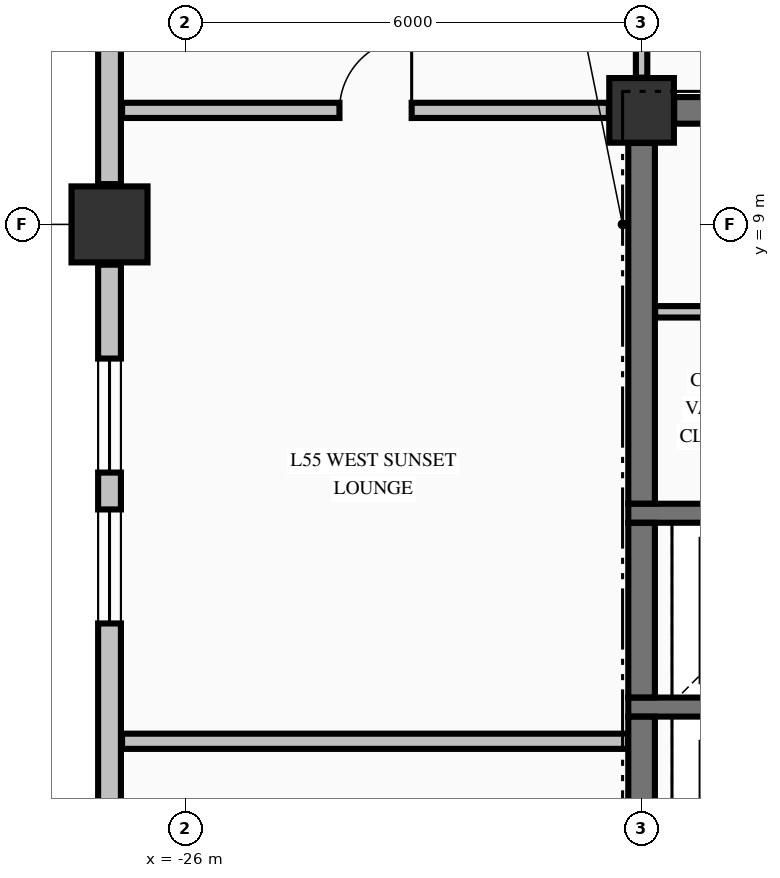
"""IFC4 building model, lengths in metres.
Left out: names, types, materials, properties, quantities, classifications, styles, units other than length and angle.
Written with IfcOpenShell. Run it as: python <this file> out.ifc"""

import sys

from ifc_helpers import new_model, si_unit, direction, frame, frame_2d, origin, origin_2d, place, context, subcontext, project, spatial, rectangle, extrude, element, fill, save


model = new_model("IFC4")
c1 = context("Model", 3, precision=1e-05, world=origin(), true_north=direction((0.0, 1.0)))
c2 = subcontext(c1, "Body", "Model", "MODEL_VIEW")
j1 = project(units=[si_unit("LENGTHUNIT", "METRE"), si_unit("PLANEANGLEUNIT", "RADIAN")], contexts=[c1])
p1 = place(None, origin())
s1 = spatial("IfcSite", under=j1, at=p1, CompositionType="ELEMENT")
p2 = place(p1, origin())
s2 = spatial("IfcBuilding", under=s1, at=p2, CompositionType="ELEMENT")
p3 = place(p2, frame((0.0, 0.0, 211.86)))
s3 = spatial("IfcBuildingStorey", under=s2, at=p3, CompositionType="ELEMENT", Elevation=211.86)
p4 = place(p3, frame((-27.0, 9.0, -0.325), z_axis=(0.0, 0.0, 1.0), x_axis=(1.0, 0.0, 0.0)))
e1 = element("IfcColumn", 1, at=p4, inside=s3, PredefinedType="COLUMN", context=c2, shape_type="SweptSolid", body=[
    extrude(rectangle(XDim=1.0, YDim=1.0, at=origin_2d()), origin(), (0.0, 0.0, 1.0), 3.475),
])
p5 = place(p3, frame((-20.0, 10.5, -0.325), z_axis=(0.0, 0.0, 1.0), x_axis=(1.0, 0.0, 0.0)))
e2 = element("IfcColumn", 2, at=p5, inside=s3, PredefinedType="COLUMN", context=c2, shape_type="SweptSolid", body=[
    extrude(rectangle(XDim=0.85, YDim=0.85, at=origin_2d()), origin(), (0.0, 0.0, 1.0), 3.475),
])
p6 = place(p3, frame((-27.0, 8.47, 0.0), z_axis=(0.0, 0.0, 1.0), x_axis=(0.0, -1.0, 0.0)))
e3 = element("IfcWall", 3, at=p6, inside=s3, PredefinedType="STANDARD", context=c2, shape_type="SweptSolid", body=[
    extrude(rectangle(XDim=7.94, YDim=0.3, at=frame_2d((3.97, 0.0))), origin(), (0.0, 0.0, 1.0), 2.542),
])
p7 = place(p6, frame((1.235, 0.0, 0.72)))
e4 = element("IfcOpeningElement", 4, at=p7, cuts=e3, PredefinedType="OPENING", context=c2, shape_type="SweptSolid", body=[
    extrude(rectangle(XDim=1.5, YDim=1.6, at=frame_2d((0.75, 0.8))), frame((0.0, 0.16, 0.0), z_axis=(0.0, -1.0, 0.0), x_axis=(1.0, 0.0, 0.0)), (0.0, 0.0, 1.0), 0.32),
])
p8 = place(p6, frame((3.22, 0.0, 0.72)))
e5 = element("IfcOpeningElement", 5, at=p8, cuts=e3, PredefinedType="OPENING", context=c2, shape_type="SweptSolid", body=[
    extrude(rectangle(XDim=1.5, YDim=1.6, at=frame_2d((0.75, 0.8))), frame((0.0, 0.16, 0.0), z_axis=(0.0, -1.0, 0.0), x_axis=(1.0, 0.0, 0.0)), (0.0, 0.0, 1.0), 0.32),
])
p9 = place(p3, frame((-27.0, 18.97, 0.0), z_axis=(0.0, 0.0, 1.0), x_axis=(0.0, -1.0, 0.0)))
e6 = element("IfcWall", 6, at=p9, inside=s3, PredefinedType="STANDARD", context=c2, shape_type="SweptSolid", body=[
    extrude(rectangle(XDim=9.44, YDim=0.3, at=frame_2d((4.72, 0.0))), origin(), (0.0, 0.0, 1.0), 2.542),
])
for number, where, z_axis, x_axis in (
    (7, (-20.175, 2.65, 0.0), (0.0, 0.0, 1.0), (1.0, 0.0, 0.0)),
    (8, (-20.175, 5.2, 0.0), (0.0, 0.0, 1.0), (1.0, 0.0, 0.0)),
):
    element("IfcWall", number, at=place(p3, frame(where, z_axis=z_axis, x_axis=x_axis)), inside=s3, PredefinedType="SOLIDWALL", context=c2, shape_type="SweptSolid", body=[
        extrude(rectangle(XDim=3.2, YDim=0.25, at=frame_2d((1.6, 0.0))), origin(), (0.0, 0.0, 1.0), 3.15),
    ])
p10 = place(p3, frame((-19.571, 10.5, 0.0), z_axis=(0.0, 0.0, 1.0), x_axis=(1.0, 0.0, 0.0)))
e9 = element("IfcWall", 9, at=p10, inside=s3, PredefinedType="SHEAR", context=c2, shape_type="SweptSolid", body=[
    extrude(rectangle(XDim=4.871, YDim=0.35, at=frame_2d((2.436, 0.0))), origin(), (0.0, 0.0, 1.0), 3.15),
])
p11 = place(p10, frame((3.121, 0.0, 0.0)))
e10 = element("IfcOpeningElement", 10, at=p11, cuts=e9, PredefinedType="OPENING", context=c2, shape_type="SweptSolid", body=[
    extrude(rectangle(XDim=1.1, YDim=2.15, at=frame_2d((0.55, 1.075))), frame((0.0, 0.185, 0.0), z_axis=(0.0, -1.0, 0.0), x_axis=(1.0, 0.0, 0.0)), (0.0, 0.0, 1.0), 0.37),
])
p12 = place(p3, frame((-26.835, 2.2, 0.0), z_axis=(0.0, 0.0, 1.0), x_axis=(1.0, 0.0, 0.0)))
e11 = element("IfcWall", 11, at=p12, inside=s3, PredefinedType="PARTITIONING", context=c2, shape_type="SweptSolid", body=[
    extrude(rectangle(XDim=6.657, YDim=0.2, at=frame_2d((3.329, 0.0))), origin(), (0.0, 0.0, 1.0), 3.15),
])
p13 = place(p3, frame((-19.822, 7.85, 0.0), z_axis=(0.0, 0.0, 1.0), x_axis=(1.0, 0.0, 0.0)))
e12 = element("IfcWall", 12, at=p13, inside=s3, PredefinedType="PARTITIONING", context=c2, shape_type="SweptSolid", body=[
    extrude(rectangle(XDim=2.822, YDim=0.15, at=frame_2d((1.411, 0.0))), origin(), (0.0, 0.0, 1.0), 3.15),
])
p14 = place(p3, frame((-26.835, 10.5, 0.0), z_axis=(0.0, 0.0, 1.0), x_axis=(1.0, 0.0, 0.0)))
e13 = element("IfcWall", 13, at=p14, inside=s3, PredefinedType="PARTITIONING", context=c2, shape_type="SweptSolid", body=[
    extrude(rectangle(XDim=6.404, YDim=0.2, at=frame_2d((3.202, 0.0))), origin(), (0.0, 0.0, 1.0), 3.15),
])
p15 = place(p14, frame((2.86, 0.0, 0.0)))
e14 = element("IfcOpeningElement", 14, at=p15, cuts=e13, PredefinedType="OPENING", context=c2, shape_type="SweptSolid", body=[
    extrude(rectangle(XDim=0.95, YDim=2.15, at=frame_2d((0.475, 1.075))), frame((0.0, 0.11, 0.0), z_axis=(0.0, -1.0, 0.0), x_axis=(1.0, 0.0, 0.0)), (0.0, 0.0, 1.0), 0.22),
])
p16 = place(p3, frame((-20.0, 0.429, 0.0), z_axis=(0.0, 0.0, 1.0), x_axis=(0.0, 1.0, 0.0)))
e15 = element("IfcWall", 15, at=p16, inside=s3, PredefinedType="SHEAR", context=c2, shape_type="SweptSolid", body=[
    extrude(rectangle(XDim=2.094, YDim=0.35, at=frame_2d((1.047, 0.0))), origin(), (0.0, 0.0, 1.0), 3.15),
])
p17 = place(p3, frame((-20.0, 2.777, 0.0), z_axis=(0.0, 0.0, 1.0), x_axis=(0.0, 1.0, 0.0)))
e16 = element("IfcWall", 16, at=p17, inside=s3, PredefinedType="SHEAR", context=c2, shape_type="SweptSolid", body=[
    extrude(rectangle(XDim=2.296, YDim=0.35, at=frame_2d((1.148, 0.0))), origin(), (0.0, 0.0, 1.0), 3.15),
])
p18 = place(p3, frame((-20.0, 5.327, 0.0), z_axis=(0.0, 0.0, 1.0), x_axis=(0.0, 1.0, 0.0)))
e17 = element("IfcWall", 17, at=p18, inside=s3, PredefinedType="SHEAR", context=c2, shape_type="SweptSolid", body=[
    extrude(rectangle(XDim=4.744, YDim=0.35, at=frame_2d((2.372, 0.0))), origin(), (0.0, 0.0, 1.0), 3.15),
])
p19 = place(p3, frame((-20.0, 10.931, 0.0), z_axis=(0.0, 0.0, 1.0), x_axis=(0.0, 1.0, 0.0)))
e18 = element("IfcWall", 18, at=p19, inside=s3, PredefinedType="PARTITIONING", context=c2, shape_type="SweptSolid", body=[
    extrude(rectangle(XDim=2.116, YDim=0.15, at=frame_2d((1.058, 0.0))), origin(), (0.0, 0.0, 1.0), 2.342),
])
p20 = place(p19, frame((0.414, 0.0, 0.0)))
e19 = element("IfcOpeningElement", 19, at=p20, cuts=e18, PredefinedType="OPENING", context=c2, shape_type="SweptSolid", body=[
    extrude(rectangle(XDim=0.95, YDim=2.15, at=frame_2d((0.475, 1.075))), frame((0.0, 0.085, 0.0), z_axis=(0.0, -1.0, 0.0), x_axis=(1.0, 0.0, 0.0)), (0.0, 0.0, 1.0), 0.17),
])
p21 = place(p7, origin())
e20 = element("IfcWindow", 20, at=p21, inside=s3, PartitioningType="SINGLE_PANEL", PredefinedType="WINDOW", context=c2, shape_type="SweptSolid", body=[
    extrude(rectangle(XDim=1.5, YDim=1.6, at=frame_2d((0.75, 0.8))), frame((0.0, 0.03, 0.0), z_axis=(0.0, -1.0, 0.0), x_axis=(1.0, 0.0, 0.0)), (0.0, 0.0, 1.0), 0.06),
])
fill(e4, e20)
p22 = place(p8, origin())
e21 = element("IfcWindow", 21, at=p22, inside=s3, PartitioningType="SINGLE_PANEL", PredefinedType="WINDOW", context=c2, shape_type="SweptSolid", body=[
    extrude(rectangle(XDim=1.5, YDim=1.6, at=frame_2d((0.75, 0.8))), frame((0.0, 0.03, 0.0), z_axis=(0.0, -1.0, 0.0), x_axis=(1.0, 0.0, 0.0)), (0.0, 0.0, 1.0), 0.06),
])
fill(e5, e21)
p23 = place(p15, origin())
e22 = element("IfcDoor", 22, at=p23, inside=s3, OperationType="SINGLE_SWING_RIGHT", PredefinedType="DOOR", context=c2, shape_type="SweptSolid", body=[
    extrude(rectangle(XDim=0.95, YDim=2.15, at=frame_2d((0.475, 1.075))), frame((0.0, 0.025, 0.0), z_axis=(0.0, -1.0, 0.0), x_axis=(1.0, 0.0, 0.0)), (0.0, 0.0, 1.0), 0.05),
])
fill(e14, e22)
save(model, sys.argv[1])
